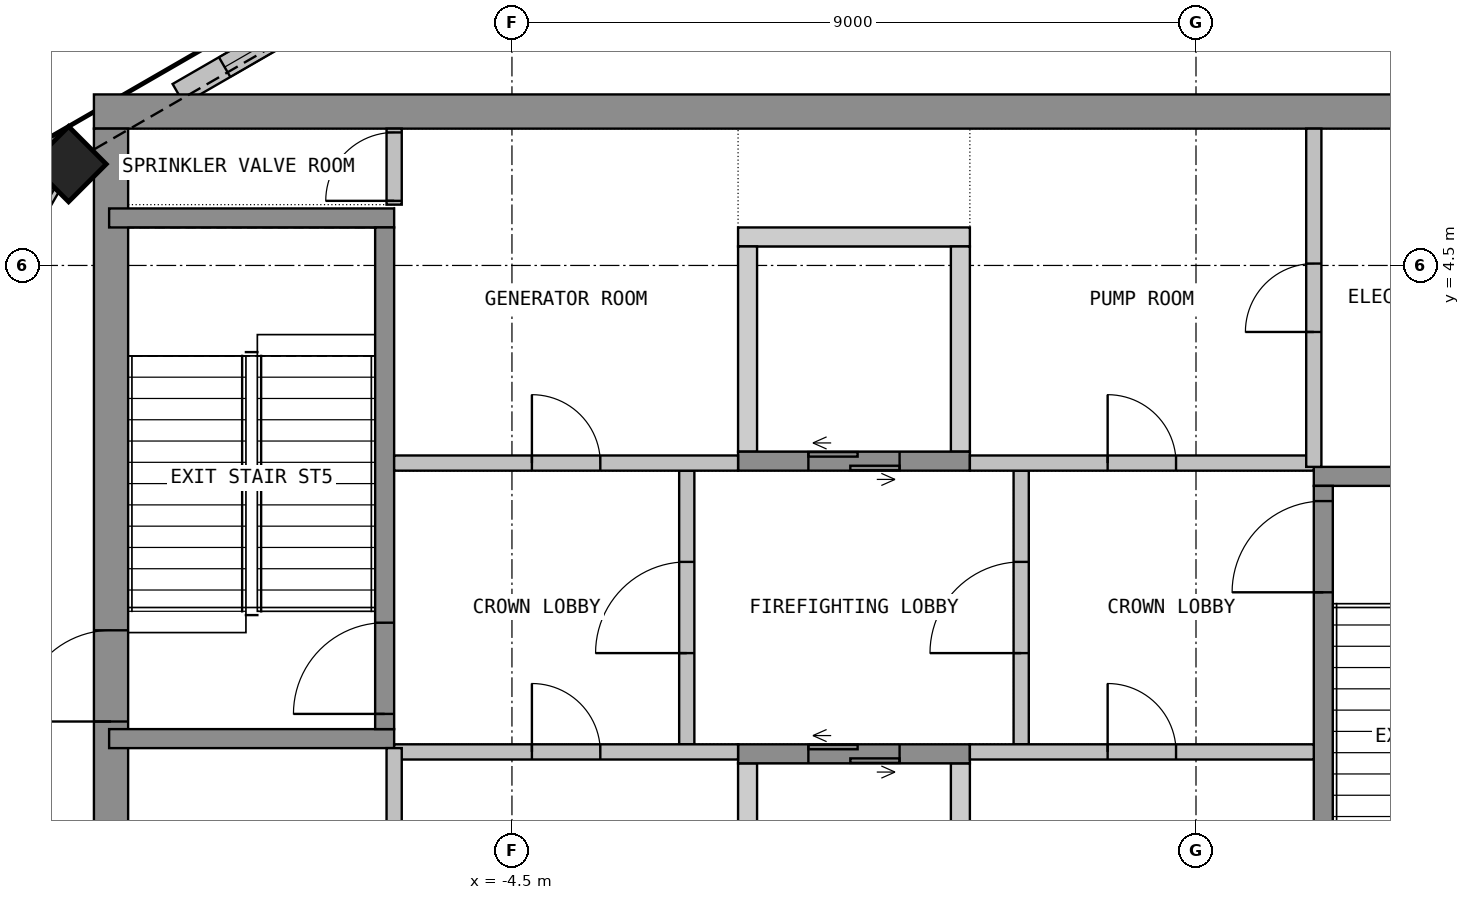
"""IFC4 building model, lengths in metres.
Left out: names, types, materials, properties, quantities, classifications, styles, units other than length and angle.
Written with IfcOpenShell. Run it as: python <this file> out.ifc"""

import sys

from ifc_helpers import new_model, si_unit, direction, frame, frame_2d, origin, origin_2d, place, context, subcontext, project, spatial, polyline, rectangle, outline, extrude, element, fill, save


model = new_model("IFC4")
c1 = context("Model", 3, precision=1e-05, world=origin(), true_north=direction((0.0, 1.0)))
c2 = subcontext(c1, "Body", "Model", "MODEL_VIEW")
j1 = project(units=[si_unit("LENGTHUNIT", "METRE"), si_unit("PLANEANGLEUNIT", "RADIAN")], contexts=[c1])
p1 = place(None, origin())
s1 = spatial("IfcSite", under=j1, at=p1, CompositionType="ELEMENT")
p2 = place(p1, origin())
s2 = spatial("IfcBuilding", under=s1, at=p2, CompositionType="ELEMENT")
p3 = place(p2, frame((0.0, 0.0, 332.4)))
s3 = spatial("IfcBuildingStorey", under=s2, at=p3, CompositionType="ELEMENT", Elevation=332.4)
p4 = place(p3, frame((-10.333, 5.833, 0.0), z_axis=(0.0, 0.0, 1.0), x_axis=(-0.707106781187, -0.707106781187, 0.0)))
e1 = element("IfcColumn", 1, at=p4, inside=s3, PredefinedType="COLUMN", context=c2, shape_type="SweptSolid", body=[
    extrude(rectangle(XDim=0.7, YDim=0.7, at=origin_2d()), origin(), (0.0, 0.0, 1.0), 4.05),
])
p5 = place(p3, frame((8.89, 6.758, 0.0), z_axis=(0.0, 0.0, 1.0), x_axis=(-0.866060442015, 0.499939307093, 0.0)))
e2 = element("IfcWall", 2, at=p5, inside=s3, PredefinedType="SOLIDWALL", context=c2, shape_type="SweptSolid", body=[
    extrude(rectangle(XDim=2.177, YDim=0.3, at=frame_2d((1.088, 0.0))), origin(), (0.0, 0.0, 1.0), 3.15),
])
p6 = place(p5, frame((0.704, 0.0, 0.6)))
e3 = element("IfcOpeningElement", 3, at=p6, cuts=e2, PredefinedType="OPENING", context=c2, shape_type="SweptSolid", body=[
    extrude(rectangle(XDim=1.3, YDim=2.3, at=frame_2d((0.65, 1.15))), frame((0.0, 0.16, 0.0), z_axis=(0.0, -1.0, 0.0), x_axis=(1.0, 0.0, 0.0)), (0.0, 0.0, 1.0), 0.32),
])
p7 = place(p3, frame((-7.005, 7.846, 0.0), z_axis=(0.0, 0.0, 1.0), x_axis=(-0.866060442015, -0.499939307093, 0.0)))
e4 = element("IfcWall", 4, at=p7, inside=s3, PredefinedType="SOLIDWALL", context=c2, shape_type="SweptSolid", body=[
    extrude(rectangle(XDim=2.177, YDim=0.3, at=frame_2d((1.088, 0.0))), origin(), (0.0, 0.0, 1.0), 3.15),
])
p8 = place(p7, frame((0.173, 0.0, 0.6)))
e5 = element("IfcOpeningElement", 5, at=p8, cuts=e4, PredefinedType="OPENING", context=c2, shape_type="SweptSolid", body=[
    extrude(rectangle(XDim=1.3, YDim=2.3, at=frame_2d((0.65, 1.15))), frame((0.0, 0.16, 0.0), z_axis=(0.0, -1.0, 0.0), x_axis=(1.0, 0.0, 0.0)), (0.0, 0.0, 1.0), 0.32),
])
p9 = place(p3, frame((-10.592, 5.542, 0.0), z_axis=(0.0, 0.0, 1.0), x_axis=(-0.499987607361, -0.86603255856, 0.0)))
e6 = element("IfcWall", 6, at=p9, inside=s3, PredefinedType="SOLIDWALL", context=c2, shape_type="SweptSolid", body=[
    extrude(rectangle(XDim=3.507, YDim=0.3, at=frame_2d((1.753, 0.0))), origin(), (0.0, 0.0, 1.0), 3.15),
])
p10 = place(p9, frame((0.553, 0.0, 0.6)))
e7 = element("IfcOpeningElement", 7, at=p10, cuts=e6, PredefinedType="OPENING", context=c2, shape_type="SweptSolid", body=[
    extrude(rectangle(XDim=2.4, YDim=2.3, at=frame_2d((1.2, 1.15))), frame((0.0, 0.16, 0.0), z_axis=(0.0, -1.0, 0.0), x_axis=(1.0, 0.0, 0.0)), (0.0, 0.0, 1.0), 0.32),
])
p11 = place(p3, frame((-12.346, -2.505, 0.0), z_axis=(0.0, 0.0, 1.0), x_axis=(0.499987607361, -0.86603255856, 0.0)))
e8 = element("IfcWall", 8, at=p11, inside=s3, PredefinedType="SOLIDWALL", context=c2, shape_type="SweptSolid", body=[
    extrude(rectangle(XDim=3.507, YDim=0.3, at=frame_2d((1.753, 0.0))), origin(), (0.0, 0.0, 1.0), 3.15),
])
p12 = place(p11, frame((0.553, 0.0, 0.6)))
e9 = element("IfcOpeningElement", 9, at=p12, cuts=e8, PredefinedType="OPENING", context=c2, shape_type="SweptSolid", body=[
    extrude(rectangle(XDim=2.4, YDim=2.3, at=frame_2d((1.2, 1.15))), frame((0.0, 0.16, 0.0), z_axis=(0.0, -1.0, 0.0), x_axis=(1.0, 0.0, 0.0)), (0.0, 0.0, 1.0), 0.32),
])
p13 = place(p3, frame((-10.0, 6.525, 0.0), z_axis=(0.0, 0.0, 1.0), x_axis=(1.0, 0.0, 0.0)))
e10 = element("IfcWall", 10, at=p13, inside=s3, PredefinedType="SHEAR", context=c2, shape_type="SweptSolid", body=[
    extrude(rectangle(XDim=20.0, YDim=0.45, at=frame_2d((10.0, 0.0))), origin(), (0.0, 0.0, 1.0), 4.05),
])
p14 = place(p3, frame((-9.775, -6.3, 0.0), z_axis=(0.0, 0.0, 1.0), x_axis=(0.0, 1.0, 0.0)))
e11 = element("IfcWall", 11, at=p14, inside=s3, PredefinedType="SHEAR", context=c2, shape_type="SweptSolid", body=[
    extrude(rectangle(XDim=12.6, YDim=0.45, at=frame_2d((6.3, 0.0))), origin(), (0.0, 0.0, 1.0), 4.05),
])
p15 = place(p14, frame((4.8, 0.0, 0.0)))
e12 = element("IfcOpeningElement", 12, at=p15, cuts=e11, PredefinedType="OPENING", context=c2, shape_type="SweptSolid", body=[
    extrude(rectangle(XDim=1.2, YDim=2.1, at=frame_2d((0.6, 1.05))), frame((0.0, 0.235, 0.0), z_axis=(0.0, -1.0, 0.0), x_axis=(1.0, 0.0, 0.0)), (0.0, 0.0, 1.0), 0.47),
])
p16 = place(p3, origin())
e13 = element("IfcWall", 13, at=p16, inside=s3, PredefinedType="SHEAR", context=c2, shape_type="SweptSolid", body=[
    extrude(outline(polyline([(-1.525, 4.75), (1.525, 4.75), (1.525, 5.0), (-1.525, 5.0), (-1.525, 4.75)])), origin(), (0.0, 0.0, 1.0), 4.05),
])
p17 = place(p3, origin())
e14 = element("IfcWall", 14, at=p17, inside=s3, PredefinedType="SHEAR", context=c2, shape_type="SweptSolid", body=[
    extrude(outline(polyline([(-1.525, 2.05), (-1.275, 2.05), (-1.275, 4.75), (-1.525, 4.75), (-1.525, 2.05)])), origin(), (0.0, 0.0, 1.0), 4.05),
])
p18 = place(p3, origin())
e15 = element("IfcWall", 15, at=p18, inside=s3, PredefinedType="SHEAR", context=c2, shape_type="SweptSolid", body=[
    extrude(outline(polyline([(1.275, 2.05), (1.525, 2.05), (1.525, 4.75), (1.275, 4.75), (1.275, 2.05)])), origin(), (0.0, 0.0, 1.0), 4.05),
])
p19 = place(p3, frame((-1.525, 1.925, 0.0), z_axis=(0.0, 0.0, 1.0), x_axis=(1.0, 0.0, 0.0)))
e16 = element("IfcWall", 16, at=p19, inside=s3, PredefinedType="SHEAR", context=c2, shape_type="SweptSolid", body=[
    extrude(rectangle(XDim=3.05, YDim=0.25, at=frame_2d((1.525, 0.0))), origin(), (0.0, 0.0, 1.0), 4.05),
])
p20 = place(p19, frame((0.925, 0.0, 0.0)))
e17 = element("IfcOpeningElement", 17, at=p20, cuts=e16, PredefinedType="OPENING", context=c2, shape_type="SweptSolid", body=[
    extrude(rectangle(XDim=1.2, YDim=2.1, at=frame_2d((0.6, 1.05))), frame((0.0, 0.135, 0.0), z_axis=(0.0, -1.0, 0.0), x_axis=(1.0, 0.0, 0.0)), (0.0, 0.0, 1.0), 0.27),
])
p21 = place(p3, origin())
e18 = element("IfcWall", 18, at=p21, inside=s3, PredefinedType="SHEAR", context=c2, shape_type="SweptSolid", body=[
    extrude(outline(polyline([(-1.525, -4.75), (-1.275, -4.75), (-1.275, -2.05), (-1.525, -2.05), (-1.525, -4.75)])), origin(), (0.0, 0.0, 1.0), 4.05),
])
p22 = place(p3, origin())
e19 = element("IfcWall", 19, at=p22, inside=s3, PredefinedType="SHEAR", context=c2, shape_type="SweptSolid", body=[
    extrude(outline(polyline([(1.275, -4.75), (1.525, -4.75), (1.525, -2.05), (1.275, -2.05), (1.275, -4.75)])), origin(), (0.0, 0.0, 1.0), 4.05),
])
p23 = place(p3, frame((-1.525, -1.925, 0.0), z_axis=(0.0, 0.0, 1.0), x_axis=(1.0, 0.0, 0.0)))
e20 = element("IfcWall", 20, at=p23, inside=s3, PredefinedType="SHEAR", context=c2, shape_type="SweptSolid", body=[
    extrude(rectangle(XDim=3.05, YDim=0.25, at=frame_2d((1.525, 0.0))), origin(), (0.0, 0.0, 1.0), 4.05),
])
p24 = place(p23, frame((0.925, 0.0, 0.0)))
e21 = element("IfcOpeningElement", 21, at=p24, cuts=e20, PredefinedType="OPENING", context=c2, shape_type="SweptSolid", body=[
    extrude(rectangle(XDim=1.2, YDim=2.1, at=frame_2d((0.6, 1.05))), frame((0.0, 0.135, 0.0), z_axis=(0.0, -1.0, 0.0), x_axis=(1.0, 0.0, 0.0)), (0.0, 0.0, 1.0), 0.27),
])
p25 = place(p3, frame((-2.2, -1.8, 0.0), z_axis=(0.0, 0.0, 1.0), x_axis=(0.0, 1.0, 0.0)))
e22 = element("IfcWall", 22, at=p25, inside=s3, PredefinedType="PARTITIONING", context=c2, shape_type="SweptSolid", body=[
    extrude(rectangle(XDim=3.6, YDim=0.2, at=frame_2d((1.8, 0.0))), origin(), (0.0, 0.0, 1.0), 4.05),
])
p26 = place(p25, frame((1.2, 0.0, 0.0)))
e23 = element("IfcOpeningElement", 23, at=p26, cuts=e22, PredefinedType="OPENING", context=c2, shape_type="SweptSolid", body=[
    extrude(rectangle(XDim=1.2, YDim=2.1, at=frame_2d((0.6, 1.05))), frame((0.0, 0.11, 0.0), z_axis=(0.0, -1.0, 0.0), x_axis=(1.0, 0.0, 0.0)), (0.0, 0.0, 1.0), 0.22),
])
p27 = place(p3, frame((2.2, -1.8, 0.0), z_axis=(0.0, 0.0, 1.0), x_axis=(0.0, 1.0, 0.0)))
e24 = element("IfcWall", 24, at=p27, inside=s3, PredefinedType="PARTITIONING", context=c2, shape_type="SweptSolid", body=[
    extrude(rectangle(XDim=3.6, YDim=0.2, at=frame_2d((1.8, 0.0))), origin(), (0.0, 0.0, 1.0), 4.05),
])
p28 = place(p27, frame((1.2, 0.0, 0.0)))
e25 = element("IfcOpeningElement", 25, at=p28, cuts=e24, PredefinedType="OPENING", context=c2, shape_type="SweptSolid", body=[
    extrude(rectangle(XDim=1.2, YDim=2.1, at=frame_2d((0.6, 1.05))), frame((0.0, 0.11, 0.0), z_axis=(0.0, -1.0, 0.0), x_axis=(1.0, 0.0, 0.0)), (0.0, 0.0, 1.0), 0.22),
])
for number, where, z_axis, x_axis in (
    (26, (-9.8, -1.725, 0.0), (0.0, 0.0, 1.0), (1.0, 0.0, 0.0)),
    (27, (-9.8, 5.125, 0.0), (0.0, 0.0, 1.0), (1.0, 0.0, 0.0)),
):
    element("IfcWall", number, at=place(p3, frame(where, z_axis=z_axis, x_axis=x_axis)), inside=s3, PredefinedType="SHEAR", context=c2, shape_type="SweptSolid", body=[
        extrude(rectangle(XDim=3.75, YDim=0.25, at=frame_2d((1.875, 0.0))), origin(), (0.0, 0.0, 1.0), 4.05),
    ])
p29 = place(p3, frame((-6.175, -1.6, 0.0), z_axis=(0.0, 0.0, 1.0), x_axis=(0.0, 1.0, 0.0)))
e28 = element("IfcWall", 28, at=p29, inside=s3, PredefinedType="SHEAR", context=c2, shape_type="SweptSolid", body=[
    extrude(rectangle(XDim=6.6, YDim=0.25, at=frame_2d((3.3, 0.0))), origin(), (0.0, 0.0, 1.0), 4.05),
])
p30 = place(p29, frame((0.2, 0.0, 0.0)))
e29 = element("IfcOpeningElement", 29, at=p30, cuts=e28, PredefinedType="OPENING", context=c2, shape_type="SweptSolid", body=[
    extrude(rectangle(XDim=1.2, YDim=2.1, at=frame_2d((0.6, 1.05))), frame((0.0, 0.135, 0.0), z_axis=(0.0, -1.0, 0.0), x_axis=(1.0, 0.0, 0.0)), (0.0, 0.0, 1.0), 0.27),
])
p31 = place(p3, frame((6.05, 1.725, 0.0), z_axis=(0.0, 0.0, 1.0), x_axis=(1.0, 0.0, 0.0)))
e30 = element("IfcWall", 30, at=p31, inside=s3, PredefinedType="SHEAR", context=c2, shape_type="SweptSolid", body=[
    extrude(rectangle(XDim=3.75, YDim=0.25, at=frame_2d((1.875, 0.0))), origin(), (0.0, 0.0, 1.0), 4.05),
])
p32 = place(p3, frame((6.175, -5.0, 0.0), z_axis=(0.0, 0.0, 1.0), x_axis=(0.0, 1.0, 0.0)))
e31 = element("IfcWall", 31, at=p32, inside=s3, PredefinedType="SHEAR", context=c2, shape_type="SweptSolid", body=[
    extrude(rectangle(XDim=6.6, YDim=0.25, at=frame_2d((3.3, 0.0))), origin(), (0.0, 0.0, 1.0), 4.05),
])
p33 = place(p32, frame((5.2, 0.0, 0.0)))
e32 = element("IfcOpeningElement", 32, at=p33, cuts=e31, PredefinedType="OPENING", context=c2, shape_type="SweptSolid", body=[
    extrude(rectangle(XDim=1.2, YDim=2.1, at=frame_2d((0.6, 1.05))), frame((0.0, 0.135, 0.0), z_axis=(0.0, -1.0, 0.0), x_axis=(1.0, 0.0, 0.0)), (0.0, 0.0, 1.0), 0.27),
])
p34 = place(p3, frame((-6.05, 1.9, 0.0), z_axis=(0.0, 0.0, 1.0), x_axis=(1.0, 0.0, 0.0)))
e33 = element("IfcWall", 33, at=p34, inside=s3, PredefinedType="PARTITIONING", context=c2, shape_type="SweptSolid", body=[
    extrude(rectangle(XDim=4.525, YDim=0.2, at=frame_2d((2.263, 0.0))), origin(), (0.0, 0.0, 1.0), 4.05),
])
p35 = place(p34, frame((1.812, 0.0, 0.0)))
e34 = element("IfcOpeningElement", 34, at=p35, cuts=e33, PredefinedType="OPENING", context=c2, shape_type="SweptSolid", body=[
    extrude(rectangle(XDim=0.9, YDim=2.1, at=frame_2d((0.45, 1.05))), frame((0.0, 0.11, 0.0), z_axis=(0.0, -1.0, 0.0), x_axis=(1.0, 0.0, 0.0)), (0.0, 0.0, 1.0), 0.22),
])
p36 = place(p3, frame((-6.05, -1.9, 0.0), z_axis=(0.0, 0.0, 1.0), x_axis=(1.0, 0.0, 0.0)))
e35 = element("IfcWall", 35, at=p36, inside=s3, PredefinedType="PARTITIONING", context=c2, shape_type="SweptSolid", body=[
    extrude(rectangle(XDim=4.525, YDim=0.2, at=frame_2d((2.263, 0.0))), origin(), (0.0, 0.0, 1.0), 4.05),
])
p37 = place(p36, frame((1.812, 0.0, 0.0)))
e36 = element("IfcOpeningElement", 36, at=p37, cuts=e35, PredefinedType="OPENING", context=c2, shape_type="SweptSolid", body=[
    extrude(rectangle(XDim=0.9, YDim=2.1, at=frame_2d((0.45, 1.05))), frame((0.0, 0.11, 0.0), z_axis=(0.0, -1.0, 0.0), x_axis=(1.0, 0.0, 0.0)), (0.0, 0.0, 1.0), 0.22),
])
p38 = place(p3, frame((1.525, 1.9, 0.0), z_axis=(0.0, 0.0, 1.0), x_axis=(1.0, 0.0, 0.0)))
e37 = element("IfcWall", 37, at=p38, inside=s3, PredefinedType="PARTITIONING", context=c2, shape_type="SweptSolid", body=[
    extrude(rectangle(XDim=4.525, YDim=0.2, at=frame_2d((2.263, 0.0))), origin(), (0.0, 0.0, 1.0), 4.05),
])
p39 = place(p38, frame((1.812, 0.0, 0.0)))
e38 = element("IfcOpeningElement", 38, at=p39, cuts=e37, PredefinedType="OPENING", context=c2, shape_type="SweptSolid", body=[
    extrude(rectangle(XDim=0.9, YDim=2.1, at=frame_2d((0.45, 1.05))), frame((0.0, 0.11, 0.0), z_axis=(0.0, -1.0, 0.0), x_axis=(1.0, 0.0, 0.0)), (0.0, 0.0, 1.0), 0.22),
])
p40 = place(p3, frame((1.525, -1.9, 0.0), z_axis=(0.0, 0.0, 1.0), x_axis=(1.0, 0.0, 0.0)))
e39 = element("IfcWall", 39, at=p40, inside=s3, PredefinedType="PARTITIONING", context=c2, shape_type="SweptSolid", body=[
    extrude(rectangle(XDim=4.525, YDim=0.2, at=frame_2d((2.263, 0.0))), origin(), (0.0, 0.0, 1.0), 4.05),
])
p41 = place(p40, frame((1.812, 0.0, 0.0)))
e40 = element("IfcOpeningElement", 40, at=p41, cuts=e39, PredefinedType="OPENING", context=c2, shape_type="SweptSolid", body=[
    extrude(rectangle(XDim=0.9, YDim=2.1, at=frame_2d((0.45, 1.05))), frame((0.0, 0.11, 0.0), z_axis=(0.0, -1.0, 0.0), x_axis=(1.0, 0.0, 0.0)), (0.0, 0.0, 1.0), 0.22),
])
p42 = place(p3, frame((-6.05, 5.3, 0.0), z_axis=(0.0, 0.0, 1.0), x_axis=(0.0, 1.0, 0.0)))
e41 = element("IfcWall", 41, at=p42, inside=s3, PredefinedType="PARTITIONING", context=c2, shape_type="SweptSolid", body=[
    extrude(rectangle(XDim=1.0, YDim=0.2, at=frame_2d((0.5, 0.0))), origin(), (0.0, 0.0, 1.0), 4.05),
])
p43 = place(p42, frame((0.05, 0.0, 0.0)))
e42 = element("IfcOpeningElement", 42, at=p43, cuts=e41, PredefinedType="OPENING", context=c2, shape_type="SweptSolid", body=[
    extrude(rectangle(XDim=0.9, YDim=2.1, at=frame_2d((0.45, 1.05))), frame((0.0, 0.11, 0.0), z_axis=(0.0, -1.0, 0.0), x_axis=(1.0, 0.0, 0.0)), (0.0, 0.0, 1.0), 0.22),
])
p44 = place(p3, frame((-6.05, -6.3, 0.0), z_axis=(0.0, 0.0, 1.0), x_axis=(0.0, 1.0, 0.0)))
e43 = element("IfcWall", 43, at=p44, inside=s3, PredefinedType="PARTITIONING", context=c2, shape_type="SweptSolid", body=[
    extrude(rectangle(XDim=4.45, YDim=0.2, at=frame_2d((2.225, 0.0))), origin(), (0.0, 0.0, 1.0), 4.05),
])
p45 = place(p44, frame((1.775, 0.0, 0.0)))
e44 = element("IfcOpeningElement", 44, at=p45, cuts=e43, PredefinedType="OPENING", context=c2, shape_type="SweptSolid", body=[
    extrude(rectangle(XDim=0.9, YDim=2.1, at=frame_2d((0.45, 1.05))), frame((0.0, 0.11, 0.0), z_axis=(0.0, -1.0, 0.0), x_axis=(1.0, 0.0, 0.0)), (0.0, 0.0, 1.0), 0.22),
])
p46 = place(p3, frame((6.05, 1.85, 0.0), z_axis=(0.0, 0.0, 1.0), x_axis=(0.0, 1.0, 0.0)))
e45 = element("IfcWall", 45, at=p46, inside=s3, PredefinedType="PARTITIONING", context=c2, shape_type="SweptSolid", body=[
    extrude(rectangle(XDim=4.45, YDim=0.2, at=frame_2d((2.225, 0.0))), origin(), (0.0, 0.0, 1.0), 4.05),
])
p47 = place(p46, frame((1.775, 0.0, 0.0)))
e46 = element("IfcOpeningElement", 46, at=p47, cuts=e45, PredefinedType="OPENING", context=c2, shape_type="SweptSolid", body=[
    extrude(rectangle(XDim=0.9, YDim=2.1, at=frame_2d((0.45, 1.05))), frame((0.0, 0.11, 0.0), z_axis=(0.0, -1.0, 0.0), x_axis=(1.0, 0.0, 0.0)), (0.0, 0.0, 1.0), 0.22),
])
p48 = place(p8, origin())
e47 = element("IfcWindow", 47, at=p48, inside=s3, PartitioningType="SINGLE_PANEL", PredefinedType="WINDOW", context=c2, shape_type="SweptSolid", body=[
    extrude(rectangle(XDim=1.3, YDim=2.3, at=frame_2d((0.65, 1.15))), frame((0.0, 0.03, 0.0), z_axis=(0.0, -1.0, 0.0), x_axis=(1.0, 0.0, 0.0)), (0.0, 0.0, 1.0), 0.06),
])
fill(e5, e47)
p49 = place(p15, origin())
e48 = element("IfcDoor", 48, at=p49, inside=s3, OperationType="SINGLE_SWING_RIGHT", PredefinedType="DOOR", context=c2, shape_type="SweptSolid", body=[
    extrude(rectangle(XDim=1.2, YDim=2.1, at=frame_2d((0.6, 1.05))), frame((0.0, 0.025, 0.0), z_axis=(0.0, -1.0, 0.0), x_axis=(1.0, 0.0, 0.0)), (0.0, 0.0, 1.0), 0.05),
])
fill(e12, e48)
p50 = place(p20, origin())
e49 = element("IfcDoor", 49, at=p50, inside=s3, OperationType="DOUBLE_DOOR_SLIDING", PredefinedType="DOOR", context=c2, shape_type="SweptSolid", body=[
    extrude(rectangle(XDim=1.2, YDim=2.1, at=frame_2d((0.6, 1.05))), frame((0.0, 0.025, 0.0), z_axis=(0.0, -1.0, 0.0), x_axis=(1.0, 0.0, 0.0)), (0.0, 0.0, 1.0), 0.05),
])
fill(e17, e49)
p51 = place(p24, origin())
e50 = element("IfcDoor", 50, at=p51, inside=s3, OperationType="DOUBLE_DOOR_SLIDING", PredefinedType="DOOR", context=c2, shape_type="SweptSolid", body=[
    extrude(rectangle(XDim=1.2, YDim=2.1, at=frame_2d((0.6, 1.05))), frame((0.0, 0.025, 0.0), z_axis=(0.0, -1.0, 0.0), x_axis=(1.0, 0.0, 0.0)), (0.0, 0.0, 1.0), 0.05),
])
fill(e21, e50)
p52 = place(p26, origin())
e51 = element("IfcDoor", 51, at=p52, inside=s3, OperationType="SINGLE_SWING_LEFT", PredefinedType="DOOR", context=c2, shape_type="SweptSolid", body=[
    extrude(rectangle(XDim=1.2, YDim=2.1, at=frame_2d((0.6, 1.05))), frame((0.0, 0.025, 0.0), z_axis=(0.0, -1.0, 0.0), x_axis=(1.0, 0.0, 0.0)), (0.0, 0.0, 1.0), 0.05),
])
fill(e23, e51)
p53 = place(p28, origin())
e52 = element("IfcDoor", 52, at=p53, inside=s3, OperationType="SINGLE_SWING_LEFT", PredefinedType="DOOR", context=c2, shape_type="SweptSolid", body=[
    extrude(rectangle(XDim=1.2, YDim=2.1, at=frame_2d((0.6, 1.05))), frame((0.0, 0.025, 0.0), z_axis=(0.0, -1.0, 0.0), x_axis=(1.0, 0.0, 0.0)), (0.0, 0.0, 1.0), 0.05),
])
fill(e25, e52)
p54 = place(p30, origin())
e53 = element("IfcDoor", 53, at=p54, inside=s3, OperationType="SINGLE_SWING_LEFT", PredefinedType="DOOR", context=c2, shape_type="SweptSolid", body=[
    extrude(rectangle(XDim=1.2, YDim=2.1, at=frame_2d((0.6, 1.05))), frame((0.0, 0.025, 0.0), z_axis=(0.0, -1.0, 0.0), x_axis=(1.0, 0.0, 0.0)), (0.0, 0.0, 1.0), 0.05),
])
fill(e29, e53)
p55 = place(p33, origin())
e54 = element("IfcDoor", 54, at=p55, inside=s3, OperationType="SINGLE_SWING_LEFT", PredefinedType="DOOR", context=c2, shape_type="SweptSolid", body=[
    extrude(rectangle(XDim=1.2, YDim=2.1, at=frame_2d((0.6, 1.05))), frame((0.0, 0.025, 0.0), z_axis=(0.0, -1.0, 0.0), x_axis=(1.0, 0.0, 0.0)), (0.0, 0.0, 1.0), 0.05),
])
fill(e32, e54)
p56 = place(p35, origin())
e55 = element("IfcDoor", 55, at=p56, inside=s3, OperationType="SINGLE_SWING_LEFT", PredefinedType="DOOR", context=c2, shape_type="SweptSolid", body=[
    extrude(rectangle(XDim=0.9, YDim=2.1, at=frame_2d((0.45, 1.05))), frame((0.0, 0.025, 0.0), z_axis=(0.0, -1.0, 0.0), x_axis=(1.0, 0.0, 0.0)), (0.0, 0.0, 1.0), 0.05),
])
fill(e34, e55)
p57 = place(p37, origin())
e56 = element("IfcDoor", 56, at=p57, inside=s3, OperationType="SINGLE_SWING_LEFT", PredefinedType="DOOR", context=c2, shape_type="SweptSolid", body=[
    extrude(rectangle(XDim=0.9, YDim=2.1, at=frame_2d((0.45, 1.05))), frame((0.0, 0.025, 0.0), z_axis=(0.0, -1.0, 0.0), x_axis=(1.0, 0.0, 0.0)), (0.0, 0.0, 1.0), 0.05),
])
fill(e36, e56)
p58 = place(p39, origin())
e57 = element("IfcDoor", 57, at=p58, inside=s3, OperationType="SINGLE_SWING_LEFT", PredefinedType="DOOR", context=c2, shape_type="SweptSolid", body=[
    extrude(rectangle(XDim=0.9, YDim=2.1, at=frame_2d((0.45, 1.05))), frame((0.0, 0.025, 0.0), z_axis=(0.0, -1.0, 0.0), x_axis=(1.0, 0.0, 0.0)), (0.0, 0.0, 1.0), 0.05),
])
fill(e38, e57)
p59 = place(p41, origin())
e58 = element("IfcDoor", 58, at=p59, inside=s3, OperationType="SINGLE_SWING_LEFT", PredefinedType="DOOR", context=c2, shape_type="SweptSolid", body=[
    extrude(rectangle(XDim=0.9, YDim=2.1, at=frame_2d((0.45, 1.05))), frame((0.0, 0.025, 0.0), z_axis=(0.0, -1.0, 0.0), x_axis=(1.0, 0.0, 0.0)), (0.0, 0.0, 1.0), 0.05),
])
fill(e40, e58)
p60 = place(p43, origin())
e59 = element("IfcDoor", 59, at=p60, inside=s3, OperationType="SINGLE_SWING_LEFT", PredefinedType="DOOR", context=c2, shape_type="SweptSolid", body=[
    extrude(rectangle(XDim=0.9, YDim=2.1, at=frame_2d((0.45, 1.05))), frame((0.0, 0.025, 0.0), z_axis=(0.0, -1.0, 0.0), x_axis=(1.0, 0.0, 0.0)), (0.0, 0.0, 1.0), 0.05),
])
fill(e42, e59)
p61 = place(p47, origin())
e60 = element("IfcDoor", 60, at=p61, inside=s3, OperationType="SINGLE_SWING_LEFT", PredefinedType="DOOR", context=c2, shape_type="SweptSolid", body=[
    extrude(rectangle(XDim=0.9, YDim=2.1, at=frame_2d((0.45, 1.05))), frame((0.0, 0.025, 0.0), z_axis=(0.0, -1.0, 0.0), x_axis=(1.0, 0.0, 0.0)), (0.0, 0.0, 1.0), 0.05),
])
fill(e46, e60)
save(model, sys.argv[1])
